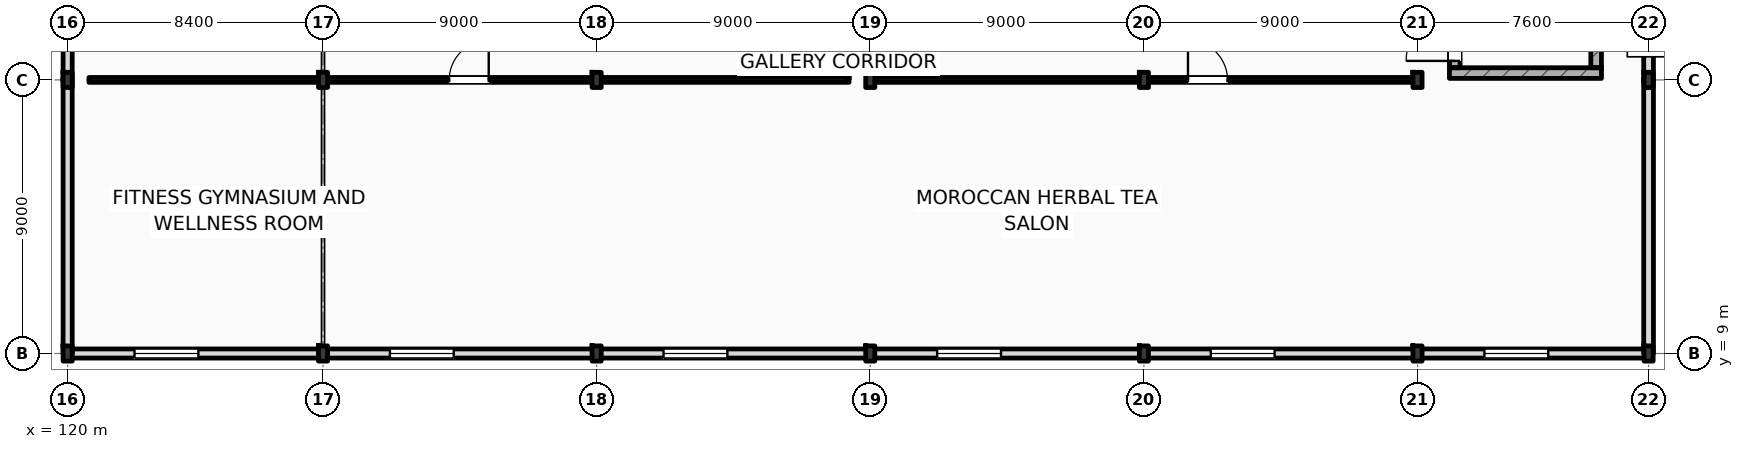
"""IFC4 building model, lengths in metres.
Left out: names, types, materials, properties, quantities, classifications, styles, units other than length and angle.
Written with IfcOpenShell. Run it as: python <this file> out.ifc"""

import sys

from ifc_helpers import new_model, si_unit, direction, frame, frame_2d, origin, origin_2d, place, context, subcontext, project, spatial, rectangle, i_section, extrude, element, fill, save


model = new_model("IFC4")
c1 = context("Model", 3, precision=1e-05, world=origin(), true_north=direction((0.0, 1.0)))
c2 = subcontext(c1, "Body", "Model", "MODEL_VIEW")
j1 = project(units=[si_unit("LENGTHUNIT", "METRE"), si_unit("PLANEANGLEUNIT", "RADIAN")], contexts=[c1])
p1 = place(None, origin())
s1 = spatial("IfcSite", under=j1, at=p1, CompositionType="ELEMENT")
p2 = place(p1, origin())
s2 = spatial("IfcBuilding", under=s1, at=p2, CompositionType="ELEMENT")
p3 = place(p2, frame((0.0, 0.0, 6.0)))
s3 = spatial("IfcBuildingStorey", under=s2, at=p3, CompositionType="ELEMENT", Elevation=6.0)
for number, where, z_axis, x_axis in (
    (1, (120.0, 9.0, 0.0), (0.0, 0.0, 1.0), (1.0, 0.0, 0.0)),
    (2, (120.0, 18.0, 0.0), (0.0, 0.0, 1.0), (1.0, 0.0, 0.0)),
    (3, (128.4, 9.0, 0.0), (0.0, 0.0, 1.0), (1.0, 0.0, 0.0)),
    (4, (128.4, 18.0, 0.0), (0.0, 0.0, 1.0), (1.0, 0.0, 0.0)),
    (5, (137.4, 9.0, 0.0), (0.0, 0.0, 1.0), (1.0, 0.0, 0.0)),
    (6, (137.4, 18.0, 0.0), (0.0, 0.0, 1.0), (1.0, 0.0, 0.0)),
    (7, (146.4, 9.0, 0.0), (0.0, 0.0, 1.0), (1.0, 0.0, 0.0)),
    (8, (146.4, 18.0, 0.0), (0.0, 0.0, 1.0), (1.0, 0.0, 0.0)),
    (9, (155.4, 9.0, 0.0), (0.0, 0.0, 1.0), (1.0, 0.0, 0.0)),
    (10, (155.4, 18.0, 0.0), (0.0, 0.0, 1.0), (1.0, 0.0, 0.0)),
    (11, (164.4, 9.0, 0.0), (0.0, 0.0, 1.0), (1.0, 0.0, 0.0)),
    (12, (164.4, 18.0, 0.0), (0.0, 0.0, 1.0), (1.0, 0.0, 0.0)),
    (13, (172.0, 9.0, 0.0), (0.0, 0.0, 1.0), (1.0, 0.0, 0.0)),
    (14, (172.0, 18.0, 0.0), (0.0, 0.0, 1.0), (1.0, 0.0, 0.0)),
):
    element("IfcColumn", number, at=place(p3, frame(where, z_axis=z_axis, x_axis=x_axis)), inside=s3, PredefinedType="COLUMN", context=c2, shape_type="SweptSolid", body=[
        extrude(i_section(OverallWidth=0.3, OverallDepth=0.5, WebThickness=0.014, FlangeThickness=0.028, FilletRadius=0.027, at=origin_2d()), origin(), (0.0, 0.0, 1.0), 5.4),
    ])
p4 = place(p3, frame((165.45, 18.225, 0.0), z_axis=(0.0, 0.0, 1.0), x_axis=(1.0, 0.0, 0.0)))
e15 = element("IfcWall", 15, at=p4, inside=s3, PredefinedType="SHEAR", context=c2, shape_type="SweptSolid", body=[
    extrude(rectangle(XDim=5.0, YDim=0.35, at=frame_2d((2.5, 0.0))), origin(), (0.0, 0.0, 1.0), 5.4),
])
p5 = place(p3, frame((165.625, 18.4, 0.0), z_axis=(0.0, 0.0, 1.0), x_axis=(0.0, 1.0, 0.0)))
e16 = element("IfcWall", 16, at=p5, inside=s3, PredefinedType="SHEAR", context=c2, shape_type="SweptSolid", body=[
    extrude(rectangle(XDim=8.58, YDim=0.35, at=frame_2d((4.29, 0.0))), origin(), (0.0, 0.0, 1.0), 5.4),
])
p6 = place(p5, frame((0.225, 0.0, 0.0)))
e17 = element("IfcOpeningElement", 17, at=p6, cuts=e16, PredefinedType="OPENING", context=c2, shape_type="SweptSolid", body=[
    extrude(rectangle(XDim=1.6, YDim=2.2, at=frame_2d((0.8, 1.1))), frame((0.0, 0.185, 0.0), z_axis=(0.0, -1.0, 0.0), x_axis=(1.0, 0.0, 0.0)), (0.0, 0.0, 1.0), 0.37),
])
p7 = place(p3, frame((170.275, 18.4, 0.0), z_axis=(0.0, 0.0, 1.0), x_axis=(0.0, 1.0, 0.0)))
e18 = element("IfcWall", 18, at=p7, inside=s3, PredefinedType="SHEAR", context=c2, shape_type="SweptSolid", body=[
    extrude(rectangle(XDim=8.58, YDim=0.35, at=frame_2d((4.29, 0.0))), origin(), (0.0, 0.0, 1.0), 5.4),
])
p8 = place(p3, frame((120.0, 9.0, 0.0), z_axis=(0.0, 0.0, 1.0), x_axis=(1.0, 0.0, 0.0)))
e19 = element("IfcWall", 19, at=p8, inside=s3, PredefinedType="STANDARD", context=c2, shape_type="SweptSolid", body=[
    extrude(rectangle(XDim=8.4, YDim=0.3, at=frame_2d((4.2, 0.0))), origin(), (0.0, 0.0, 1.0), 4.49),
])
p9 = place(p8, frame((2.2, 0.0, 1.05)))
e20 = element("IfcOpeningElement", 20, at=p9, cuts=e19, PredefinedType="OPENING", context=c2, shape_type="SweptSolid", body=[
    extrude(rectangle(XDim=2.1, YDim=2.2, at=frame_2d((1.05, 1.1))), frame((0.0, 0.16, 0.0), z_axis=(0.0, -1.0, 0.0), x_axis=(1.0, 0.0, 0.0)), (0.0, 0.0, 1.0), 0.32),
])
p10 = place(p3, frame((128.4, 9.0, 0.0), z_axis=(0.0, 0.0, 1.0), x_axis=(1.0, 0.0, 0.0)))
e21 = element("IfcWall", 21, at=p10, inside=s3, PredefinedType="STANDARD", context=c2, shape_type="SweptSolid", body=[
    extrude(rectangle(XDim=9.0, YDim=0.3, at=frame_2d((4.5, 0.0))), origin(), (0.0, 0.0, 1.0), 4.44),
])
p11 = place(p10, frame((2.2, 0.0, 1.05)))
e22 = element("IfcOpeningElement", 22, at=p11, cuts=e21, PredefinedType="OPENING", context=c2, shape_type="SweptSolid", body=[
    extrude(rectangle(XDim=2.1, YDim=2.2, at=frame_2d((1.05, 1.1))), frame((0.0, 0.16, 0.0), z_axis=(0.0, -1.0, 0.0), x_axis=(1.0, 0.0, 0.0)), (0.0, 0.0, 1.0), 0.32),
])
p12 = place(p3, frame((137.4, 9.0, 0.0), z_axis=(0.0, 0.0, 1.0), x_axis=(1.0, 0.0, 0.0)))
e23 = element("IfcWall", 23, at=p12, inside=s3, PredefinedType="STANDARD", context=c2, shape_type="SweptSolid", body=[
    extrude(rectangle(XDim=9.0, YDim=0.3, at=frame_2d((4.5, 0.0))), origin(), (0.0, 0.0, 1.0), 4.44),
])
p13 = place(p12, frame((2.2, 0.0, 1.05)))
e24 = element("IfcOpeningElement", 24, at=p13, cuts=e23, PredefinedType="OPENING", context=c2, shape_type="SweptSolid", body=[
    extrude(rectangle(XDim=2.1, YDim=2.2, at=frame_2d((1.05, 1.1))), frame((0.0, 0.16, 0.0), z_axis=(0.0, -1.0, 0.0), x_axis=(1.0, 0.0, 0.0)), (0.0, 0.0, 1.0), 0.32),
])
p14 = place(p3, frame((146.4, 9.0, 0.0), z_axis=(0.0, 0.0, 1.0), x_axis=(1.0, 0.0, 0.0)))
e25 = element("IfcWall", 25, at=p14, inside=s3, PredefinedType="STANDARD", context=c2, shape_type="SweptSolid", body=[
    extrude(rectangle(XDim=9.0, YDim=0.3, at=frame_2d((4.5, 0.0))), origin(), (0.0, 0.0, 1.0), 4.44),
])
p15 = place(p14, frame((2.2, 0.0, 1.05)))
e26 = element("IfcOpeningElement", 26, at=p15, cuts=e25, PredefinedType="OPENING", context=c2, shape_type="SweptSolid", body=[
    extrude(rectangle(XDim=2.1, YDim=2.2, at=frame_2d((1.05, 1.1))), frame((0.0, 0.16, 0.0), z_axis=(0.0, -1.0, 0.0), x_axis=(1.0, 0.0, 0.0)), (0.0, 0.0, 1.0), 0.32),
])
p16 = place(p3, frame((155.4, 9.0, 0.0), z_axis=(0.0, 0.0, 1.0), x_axis=(1.0, 0.0, 0.0)))
e27 = element("IfcWall", 27, at=p16, inside=s3, PredefinedType="STANDARD", context=c2, shape_type="SweptSolid", body=[
    extrude(rectangle(XDim=9.0, YDim=0.3, at=frame_2d((4.5, 0.0))), origin(), (0.0, 0.0, 1.0), 4.44),
])
p17 = place(p16, frame((2.2, 0.0, 1.05)))
e28 = element("IfcOpeningElement", 28, at=p17, cuts=e27, PredefinedType="OPENING", context=c2, shape_type="SweptSolid", body=[
    extrude(rectangle(XDim=2.1, YDim=2.2, at=frame_2d((1.05, 1.1))), frame((0.0, 0.16, 0.0), z_axis=(0.0, -1.0, 0.0), x_axis=(1.0, 0.0, 0.0)), (0.0, 0.0, 1.0), 0.32),
])
p18 = place(p3, frame((164.4, 9.0, 0.0), z_axis=(0.0, 0.0, 1.0), x_axis=(1.0, 0.0, 0.0)))
e29 = element("IfcWall", 29, at=p18, inside=s3, PredefinedType="STANDARD", context=c2, shape_type="SweptSolid", body=[
    extrude(rectangle(XDim=7.6, YDim=0.3, at=frame_2d((3.8, 0.0))), origin(), (0.0, 0.0, 1.0), 4.54),
])
p19 = place(p18, frame((2.2, 0.0, 1.05)))
e30 = element("IfcOpeningElement", 30, at=p19, cuts=e29, PredefinedType="OPENING", context=c2, shape_type="SweptSolid", body=[
    extrude(rectangle(XDim=2.1, YDim=2.2, at=frame_2d((1.05, 1.1))), frame((0.0, 0.16, 0.0), z_axis=(0.0, -1.0, 0.0), x_axis=(1.0, 0.0, 0.0)), (0.0, 0.0, 1.0), 0.32),
])
p20 = place(p3, frame((172.0, 9.0, 0.0), z_axis=(0.0, 0.0, 1.0), x_axis=(0.0, 1.0, 0.0)))
e31 = element("IfcWall", 31, at=p20, inside=s3, PredefinedType="STANDARD", context=c2, shape_type="SweptSolid", body=[
    extrude(rectangle(XDim=9.0, YDim=0.32, at=frame_2d((4.5, 0.0))), origin(), (0.0, 0.0, 1.0), 4.55),
])
p21 = place(p3, frame((120.0, 9.0, 0.0), z_axis=(0.0, 0.0, 1.0), x_axis=(0.0, 1.0, 0.0)))
e32 = element("IfcWall", 32, at=p21, inside=s3, PredefinedType="STANDARD", context=c2, shape_type="SweptSolid", body=[
    extrude(rectangle(XDim=9.0, YDim=0.3, at=frame_2d((4.5, 0.0))), origin(), (0.0, 0.0, 1.0), 4.55),
])
p22 = place(p3, frame((172.0, 18.0, 0.0), z_axis=(0.0, 0.0, 1.0), x_axis=(0.0, 1.0, 0.0)))
e33 = element("IfcWall", 33, at=p22, inside=s3, PredefinedType="STANDARD", context=c2, shape_type="SweptSolid", body=[
    extrude(rectangle(XDim=9.0, YDim=0.32, at=frame_2d((4.5, 0.0))), origin(), (0.0, 0.0, 1.0), 4.55),
])
p23 = place(p3, frame((120.0, 18.0, 0.0), z_axis=(0.0, 0.0, 1.0), x_axis=(0.0, 1.0, 0.0)))
e34 = element("IfcWall", 34, at=p23, inside=s3, PredefinedType="STANDARD", context=c2, shape_type="SweptSolid", body=[
    extrude(rectangle(XDim=9.0, YDim=0.3, at=frame_2d((4.5, 0.0))), origin(), (0.0, 0.0, 1.0), 4.55),
])
p24 = place(p3, frame((120.7, 18.0, 0.0), z_axis=(0.0, 0.0, 1.0), x_axis=(1.0, 0.0, 0.0)))
e35 = element("IfcWall", 35, at=p24, inside=s3, PredefinedType="PARTITIONING", context=c2, shape_type="SweptSolid", body=[
    extrude(rectangle(XDim=25.0, YDim=0.16, at=frame_2d((12.5, 0.0))), origin(), (0.0, 0.0, 1.0), 4.44),
])
p25 = place(p24, frame((11.85, 0.0, 0.0)))
e36 = element("IfcOpeningElement", 36, at=p25, cuts=e35, PredefinedType="OPENING", context=c2, shape_type="SweptSolid", body=[
    extrude(rectangle(XDim=1.3, YDim=2.2, at=frame_2d((0.65, 1.1))), frame((0.0, 0.09, 0.0), z_axis=(0.0, -1.0, 0.0), x_axis=(1.0, 0.0, 0.0)), (0.0, 0.0, 1.0), 0.18),
])
p26 = place(p3, frame((146.5, 18.0, 0.0), z_axis=(0.0, 0.0, 1.0), x_axis=(1.0, 0.0, 0.0)))
e37 = element("IfcWall", 37, at=p26, inside=s3, PredefinedType="PARTITIONING", context=c2, shape_type="SweptSolid", body=[
    extrude(rectangle(XDim=18.0, YDim=0.16, at=frame_2d((9.0, 0.0))), origin(), (0.0, 0.0, 1.0), 4.44),
])
p27 = place(p26, frame((10.35, 0.0, 0.0)))
e38 = element("IfcOpeningElement", 38, at=p27, cuts=e37, PredefinedType="OPENING", context=c2, shape_type="SweptSolid", body=[
    extrude(rectangle(XDim=1.3, YDim=2.2, at=frame_2d((0.65, 1.1))), frame((0.0, 0.09, 0.0), z_axis=(0.0, -1.0, 0.0), x_axis=(1.0, 0.0, 0.0)), (0.0, 0.0, 1.0), 0.18),
])
p28 = place(p9, origin())
e39 = element("IfcWindow", 39, at=p28, inside=s3, PartitioningType="DOUBLE_PANEL_VERTICAL", PredefinedType="WINDOW", context=c2, shape_type="SweptSolid", body=[
    extrude(rectangle(XDim=2.1, YDim=2.2, at=frame_2d((1.05, 1.1))), frame((0.0, 0.03, 0.0), z_axis=(0.0, -1.0, 0.0), x_axis=(1.0, 0.0, 0.0)), (0.0, 0.0, 1.0), 0.06),
])
fill(e20, e39)
p29 = place(p11, origin())
e40 = element("IfcWindow", 40, at=p29, inside=s3, PartitioningType="DOUBLE_PANEL_VERTICAL", PredefinedType="WINDOW", context=c2, shape_type="SweptSolid", body=[
    extrude(rectangle(XDim=2.1, YDim=2.2, at=frame_2d((1.05, 1.1))), frame((0.0, 0.03, 0.0), z_axis=(0.0, -1.0, 0.0), x_axis=(1.0, 0.0, 0.0)), (0.0, 0.0, 1.0), 0.06),
])
fill(e22, e40)
p30 = place(p13, origin())
e41 = element("IfcWindow", 41, at=p30, inside=s3, PartitioningType="DOUBLE_PANEL_VERTICAL", PredefinedType="WINDOW", context=c2, shape_type="SweptSolid", body=[
    extrude(rectangle(XDim=2.1, YDim=2.2, at=frame_2d((1.05, 1.1))), frame((0.0, 0.03, 0.0), z_axis=(0.0, -1.0, 0.0), x_axis=(1.0, 0.0, 0.0)), (0.0, 0.0, 1.0), 0.06),
])
fill(e24, e41)
p31 = place(p15, origin())
e42 = element("IfcWindow", 42, at=p31, inside=s3, PartitioningType="DOUBLE_PANEL_VERTICAL", PredefinedType="WINDOW", context=c2, shape_type="SweptSolid", body=[
    extrude(rectangle(XDim=2.1, YDim=2.2, at=frame_2d((1.05, 1.1))), frame((0.0, 0.03, 0.0), z_axis=(0.0, -1.0, 0.0), x_axis=(1.0, 0.0, 0.0)), (0.0, 0.0, 1.0), 0.06),
])
fill(e26, e42)
p32 = place(p17, origin())
e43 = element("IfcWindow", 43, at=p32, inside=s3, PartitioningType="DOUBLE_PANEL_VERTICAL", PredefinedType="WINDOW", context=c2, shape_type="SweptSolid", body=[
    extrude(rectangle(XDim=2.1, YDim=2.2, at=frame_2d((1.05, 1.1))), frame((0.0, 0.03, 0.0), z_axis=(0.0, -1.0, 0.0), x_axis=(1.0, 0.0, 0.0)), (0.0, 0.0, 1.0), 0.06),
])
fill(e28, e43)
p33 = place(p19, origin())
e44 = element("IfcWindow", 44, at=p33, inside=s3, PartitioningType="DOUBLE_PANEL_VERTICAL", PredefinedType="WINDOW", context=c2, shape_type="SweptSolid", body=[
    extrude(rectangle(XDim=2.1, YDim=2.2, at=frame_2d((1.05, 1.1))), frame((0.0, 0.03, 0.0), z_axis=(0.0, -1.0, 0.0), x_axis=(1.0, 0.0, 0.0)), (0.0, 0.0, 1.0), 0.06),
])
fill(e30, e44)
p34 = place(p6, origin())
e45 = element("IfcDoor", 45, at=p34, inside=s3, OperationType="SINGLE_SWING_LEFT", PredefinedType="DOOR", context=c2, shape_type="SweptSolid", body=[
    extrude(rectangle(XDim=1.6, YDim=2.2, at=frame_2d((0.8, 1.1))), frame((0.0, 0.025, 0.0), z_axis=(0.0, -1.0, 0.0), x_axis=(1.0, 0.0, 0.0)), (0.0, 0.0, 1.0), 0.05),
])
fill(e17, e45)
p35 = place(p25, origin())
e46 = element("IfcDoor", 46, at=p35, inside=s3, OperationType="SINGLE_SWING_RIGHT", PredefinedType="DOOR", context=c2, shape_type="SweptSolid", body=[
    extrude(rectangle(XDim=1.3, YDim=2.2, at=frame_2d((0.65, 1.1))), frame((0.0, 0.025, 0.0), z_axis=(0.0, -1.0, 0.0), x_axis=(1.0, 0.0, 0.0)), (0.0, 0.0, 1.0), 0.05),
])
fill(e36, e46)
p36 = place(p27, origin())
e47 = element("IfcDoor", 47, at=p36, inside=s3, OperationType="SINGLE_SWING_LEFT", PredefinedType="DOOR", context=c2, shape_type="SweptSolid", body=[
    extrude(rectangle(XDim=1.3, YDim=2.2, at=frame_2d((0.65, 1.1))), frame((0.0, 0.025, 0.0), z_axis=(0.0, -1.0, 0.0), x_axis=(1.0, 0.0, 0.0)), (0.0, 0.0, 1.0), 0.05),
])
fill(e38, e47)
save(model, sys.argv[1])
